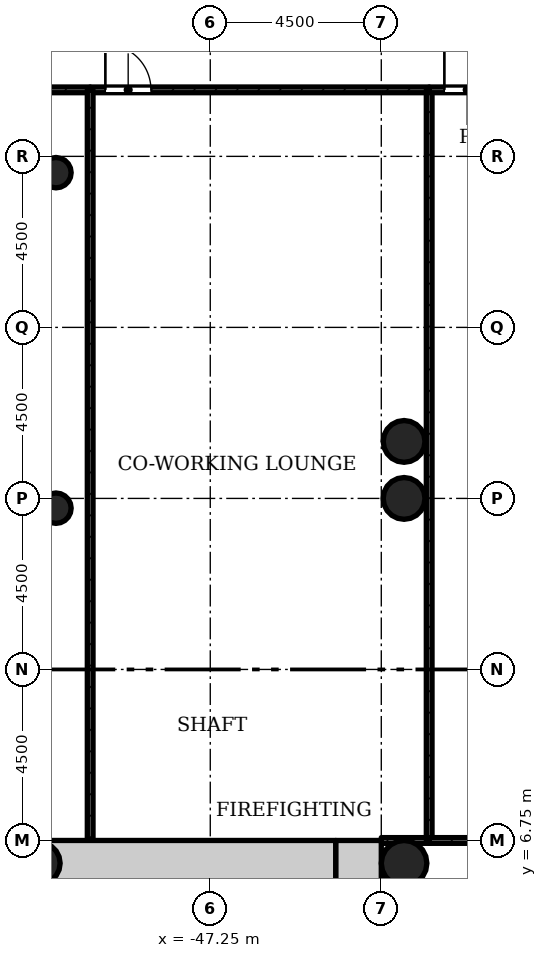
"""IFC4 building model, lengths in metres.
Left out: names, types, materials, properties, quantities, classifications, styles, units other than length and angle.
Written with IfcOpenShell. Run it as: python <this file> out.ifc"""

import sys

from ifc_helpers import new_model, si_unit, direction, frame, frame_2d, origin, origin_2d, place, context, subcontext, project, spatial, rectangle, hollow_circle, extrude, element, fill, save


model = new_model("IFC4")
c1 = context("Model", 3, precision=1e-05, world=origin(), true_north=direction((0.0, 1.0)))
c2 = subcontext(c1, "Body", "Model", "MODEL_VIEW")
j1 = project(units=[si_unit("LENGTHUNIT", "METRE"), si_unit("PLANEANGLEUNIT", "RADIAN")], contexts=[c1])
p1 = place(None, origin())
s1 = spatial("IfcSite", under=j1, at=p1, CompositionType="ELEMENT")
p2 = place(p1, origin())
s2 = spatial("IfcBuilding", under=s1, at=p2, CompositionType="ELEMENT")
p3 = place(p2, frame((0.0, 0.0, 20.0)))
s3 = spatial("IfcBuildingStorey", under=s2, at=p3, CompositionType="ELEMENT", Elevation=20.0)
p4 = place(p3, frame((-43.35, -5.55, 0.0), z_axis=(0.0, 0.0, 1.0), x_axis=(0.0, 1.0, 0.0)))
e1 = element("IfcWall", 1, at=p4, inside=s3, PredefinedType="SHEAR", context=c2, shape_type="SweptSolid", body=[
    extrude(rectangle(XDim=12.3, YDim=1.2, at=frame_2d((6.15, 0.0))), origin(), (0.0, 0.0, 1.0), 4.5),
])
p5 = place(p4, frame((4.65, 0.0, 0.0)))
e2 = element("IfcOpeningElement", 2, at=p5, cuts=e1, PredefinedType="OPENING", context=c2, shape_type="SweptSolid", body=[
    extrude(rectangle(XDim=1.8, YDim=2.1, at=frame_2d((0.9, 1.05))), frame((0.0, 0.61, 0.0), z_axis=(0.0, -1.0, 0.0), x_axis=(1.0, 0.0, 0.0)), (0.0, 0.0, 1.0), 1.22),
])
p6 = place(p3, frame((-43.95, 6.15, 0.0), z_axis=(0.0, 0.0, 1.0), x_axis=(-1.0, 0.0, 0.0)))
e3 = element("IfcWall", 3, at=p6, inside=s3, PredefinedType="SHEAR", context=c2, shape_type="SweptSolid", body=[
    extrude(rectangle(XDim=7.8, YDim=1.2, at=frame_2d((3.9, 0.0))), origin(), (0.0, 0.0, 1.0), 4.5),
])
for number, where, z_axis, x_axis in (
    (4, (-42.15, 15.75, 0.0), (0.0, 0.0, 1.0), (1.0, 0.0, 0.0)),
    (5, (-42.15, 17.25, 0.0), (0.0, 0.0, 1.0), (1.0, 0.0, 0.0)),
    (6, (-51.75, 6.15, 0.0), (0.0, 0.0, 1.0), (1.0, 0.0, 0.0)),
):
    element("IfcColumn", number, at=place(p3, frame(where, z_axis=z_axis, x_axis=x_axis)), inside=s3, PredefinedType="COLUMN", context=c2, shape_type="SweptSolid", body=[
        extrude(hollow_circle(Radius=0.55, WallThickness=0.04, at=origin_2d()), origin(), (0.0, 0.0, 1.0), 4.5),
    ])
p7 = place(p3, frame((-42.15, 6.15, 0.0), z_axis=(0.0, 0.0, 1.0), x_axis=(1.0, 0.0, 0.0)))
e7 = element("IfcColumn", 7, at=p7, inside=s3, PredefinedType="COLUMN", context=c2, shape_type="SweptSolid", body=[
    extrude(hollow_circle(Radius=0.6, WallThickness=0.045, at=origin_2d()), origin(), (0.0, 0.0, 1.0), 4.5),
])
for number, where, z_axis, x_axis in (
    (8, (-51.31, 15.493, 0.0), (0.0, 0.0, 1.0), (1.0, 0.0, 0.0)),
    (9, (-51.31, 24.321, 0.0), (0.0, 0.0, 1.0), (1.0, 0.0, 0.0)),
):
    element("IfcColumn", number, at=place(p3, frame(where, z_axis=z_axis, x_axis=x_axis)), inside=s3, PredefinedType="COLUMN", context=c2, shape_type="SweptSolid", body=[
        extrude(hollow_circle(Radius=0.4, WallThickness=0.028, at=origin_2d()), origin(), (0.0, 0.0, 1.0), 4.08),
    ])
p8 = place(p3, frame((-52.37, 26.5, 0.0), z_axis=(0.0, 0.0, 1.0), x_axis=(1.0, 0.0, 0.0)))
e10 = element("IfcWall", 10, at=p8, inside=s3, PredefinedType="PARTITIONING", context=c2, shape_type="SweptSolid", body=[
    extrude(rectangle(XDim=1.96, YDim=0.15, at=frame_2d((0.98, 0.0))), origin(), (0.0, 0.0, 1.0), 4.075),
])
p9 = place(p3, frame((-50.41, 26.5, 0.0), z_axis=(0.0, 0.0, 1.0), x_axis=(1.0, 0.0, 0.0)))
e11 = element("IfcWall", 11, at=p9, inside=s3, PredefinedType="PARTITIONING", context=c2, shape_type="SweptSolid", body=[
    extrude(rectangle(XDim=8.92, YDim=0.15, at=frame_2d((4.46, 0.0))), origin(), (0.0, 0.0, 1.0), 4.075),
])
p10 = place(p9, frame((0.4, 0.0, 0.0)))
e12 = element("IfcOpeningElement", 12, at=p10, cuts=e11, PredefinedType="OPENING", context=c2, shape_type="SweptSolid", body=[
    extrude(rectangle(XDim=1.2, YDim=2.1, at=frame_2d((0.6, 1.05))), frame((0.0, 0.085, 0.0), z_axis=(0.0, -1.0, 0.0), x_axis=(1.0, 0.0, 0.0)), (0.0, 0.0, 1.0), 0.17),
])
p11 = place(p3, frame((-41.49, 6.75, 0.0), z_axis=(0.0, 0.0, 1.0), x_axis=(-1.0, 0.0, 0.0)))
e13 = element("IfcWall", 13, at=p11, inside=s3, PredefinedType="PARTITIONING", context=c2, shape_type="SweptSolid", body=[
    extrude(rectangle(XDim=1.26, YDim=0.15, at=frame_2d((0.63, 0.0))), origin(), (0.0, 0.0, 1.0), 4.075),
])
for number, where, z_axis, x_axis in (
    (14, (-50.41, 6.75, 0.0), (0.0, 0.0, 1.0), (0.0, 1.0, 0.0)),
    (15, (-41.49, 26.5, 0.0), (0.0, 0.0, 1.0), (0.0, -1.0, 0.0)),
):
    element("IfcWall", number, at=place(p3, frame(where, z_axis=z_axis, x_axis=x_axis)), inside=s3, PredefinedType="PARTITIONING", context=c2, shape_type="SweptSolid", body=[
        extrude(rectangle(XDim=19.75, YDim=0.15, at=frame_2d((9.875, 0.0))), origin(), (0.0, 0.0, 1.0), 4.075),
    ])
p12 = place(p3, frame((-41.49, 26.5, 0.0), z_axis=(0.0, 0.0, 1.0), x_axis=(1.0, 0.0, 0.0)))
e16 = element("IfcWall", 16, at=p12, inside=s3, PredefinedType="PARTITIONING", context=c2, shape_type="SweptSolid", body=[
    extrude(rectangle(XDim=8.92, YDim=0.15, at=frame_2d((4.46, 0.0))), origin(), (0.0, 0.0, 1.0), 4.075),
])
p13 = place(p12, frame((0.4, 0.0, 0.0)))
e17 = element("IfcOpeningElement", 17, at=p13, cuts=e16, PredefinedType="OPENING", context=c2, shape_type="SweptSolid", body=[
    extrude(rectangle(XDim=1.2, YDim=2.1, at=frame_2d((0.6, 1.05))), frame((0.0, 0.085, 0.0), z_axis=(0.0, -1.0, 0.0), x_axis=(1.0, 0.0, 0.0)), (0.0, 0.0, 1.0), 0.17),
])
p14 = place(p3, frame((-32.57, 6.75, 0.0), z_axis=(0.0, 0.0, 1.0), x_axis=(-1.0, 0.0, 0.0)))
e18 = element("IfcWall", 18, at=p14, inside=s3, PredefinedType="PARTITIONING", context=c2, shape_type="SweptSolid", body=[
    extrude(rectangle(XDim=8.92, YDim=0.15, at=frame_2d((4.46, 0.0))), origin(), (0.0, 0.0, 1.0), 4.075),
])
p15 = place(p10, origin())
e19 = element("IfcDoor", 19, at=p15, inside=s3, OperationType="SINGLE_SWING_RIGHT", PredefinedType="DOOR", context=c2, shape_type="SweptSolid", body=[
    extrude(rectangle(XDim=1.2, YDim=2.1, at=frame_2d((0.6, 1.05))), frame((0.0, 0.025, 0.0), z_axis=(0.0, -1.0, 0.0), x_axis=(1.0, 0.0, 0.0)), (0.0, 0.0, 1.0), 0.05),
])
fill(e12, e19)
p16 = place(p13, origin())
e20 = element("IfcDoor", 20, at=p16, inside=s3, OperationType="SINGLE_SWING_RIGHT", PredefinedType="DOOR", context=c2, shape_type="SweptSolid", body=[
    extrude(rectangle(XDim=1.2, YDim=2.1, at=frame_2d((0.6, 1.05))), frame((0.0, 0.025, 0.0), z_axis=(0.0, -1.0, 0.0), x_axis=(1.0, 0.0, 0.0)), (0.0, 0.0, 1.0), 0.05),
])
fill(e17, e20)
save(model, sys.argv[1])
